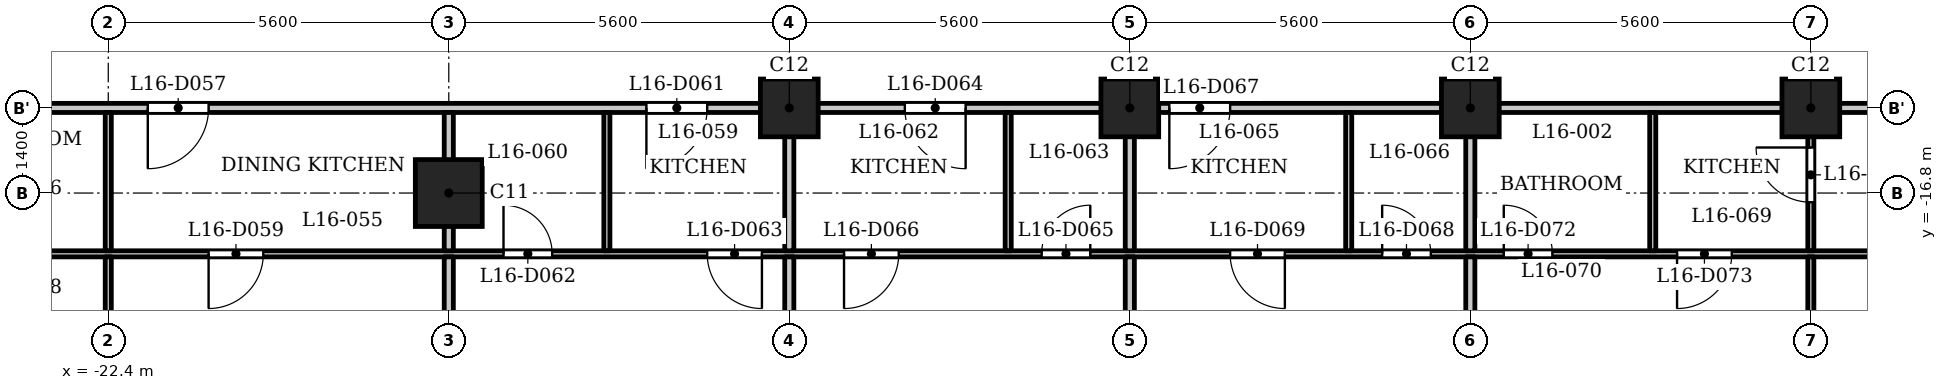
"""IFC4 building model, lengths in metres.
Left out: names, types, materials, properties, quantities, classifications, styles, units other than length and angle.
Written with IfcOpenShell. Run it as: python <this file> out.ifc"""

import sys

from ifc_helpers import new_model, si_unit, direction, frame, frame_2d, origin, origin_2d, place, context, subcontext, project, spatial, rectangle, extrude, element, fill, save


model = new_model("IFC4")
c1 = context("Model", 3, precision=1e-05, world=origin(), true_north=direction((0.0, 1.0)))
c2 = subcontext(c1, "Body", "Model", "MODEL_VIEW")
j1 = project(units=[si_unit("LENGTHUNIT", "METRE"), si_unit("PLANEANGLEUNIT", "RADIAN")], contexts=[c1])
p1 = place(None, origin())
s1 = spatial("IfcSite", under=j1, at=p1, CompositionType="ELEMENT")
p2 = place(p1, origin())
s2 = spatial("IfcBuilding", under=s1, at=p2, CompositionType="ELEMENT")
p3 = place(p2, frame((0.0, 0.0, 65.5)))
s3 = spatial("IfcBuildingStorey", under=s2, at=p3, CompositionType="ELEMENT", Elevation=65.5)
p4 = place(p3, frame((-16.8, -16.8, 0.0), z_axis=(0.0, 0.0, 1.0), x_axis=(1.0, 0.0, 0.0)))
e1 = element("IfcColumn", 1, at=p4, inside=s3, PredefinedType="COLUMN", context=c2, shape_type="SweptSolid", body=[
    extrude(rectangle(XDim=1.1, YDim=1.1, at=origin_2d()), origin(), (0.0, 0.0, 1.0), 3.5),
])
for number, where, z_axis, x_axis in (
    (2, (-11.2, -15.4, 0.0), (0.0, 0.0, 1.0), (1.0, 0.0, 0.0)),
    (3, (-5.6, -15.4, 0.0), (0.0, 0.0, 1.0), (1.0, 0.0, 0.0)),
    (4, (0.0, -15.4, 0.0), (0.0, 0.0, 1.0), (1.0, 0.0, 0.0)),
    (5, (5.6, -15.4, 0.0), (0.0, 0.0, 1.0), (1.0, 0.0, 0.0)),
):
    element("IfcColumn", number, at=place(p3, frame(where, z_axis=z_axis, x_axis=x_axis)), inside=s3, PredefinedType="COLUMN", context=c2, shape_type="SweptSolid", body=[
        extrude(rectangle(XDim=0.95, YDim=0.95, at=origin_2d()), origin(), (0.0, 0.0, 1.0), 3.5),
    ])
p5 = place(p3, frame((-26.394, -17.8, 0.0), z_axis=(0.0, 0.0, 1.0), x_axis=(1.0, 0.0, 0.0)))
e6 = element("IfcWall", 6, at=p5, inside=s3, PredefinedType="PARTITIONING", context=c2, shape_type="SweptSolid", body=[
    extrude(rectangle(XDim=53.034, YDim=0.1, at=frame_2d((26.517, 0.0))), origin(), (0.0, 0.0, 1.0), 3.2),
])
p6 = place(p5, frame((0.794, 0.0, 0.0)))
e7 = element("IfcOpeningElement", 7, at=p6, cuts=e6, PredefinedType="OPENING", context=c2, shape_type="SweptSolid", body=[
    extrude(rectangle(XDim=0.8, YDim=2.1, at=frame_2d((0.4, 1.05))), frame((0.0, 0.06, 0.0), z_axis=(0.0, -1.0, 0.0), x_axis=(1.0, 0.0, 0.0)), (0.0, 0.0, 1.0), 0.12),
])
p7 = place(p5, frame((5.644, 0.0, 0.0)))
e8 = element("IfcOpeningElement", 8, at=p7, cuts=e6, PredefinedType="OPENING", context=c2, shape_type="SweptSolid", body=[
    extrude(rectangle(XDim=0.9, YDim=2.1, at=frame_2d((0.45, 1.05))), frame((0.0, 0.06, 0.0), z_axis=(0.0, -1.0, 0.0), x_axis=(1.0, 0.0, 0.0)), (0.0, 0.0, 1.0), 0.12),
])
p8 = place(p5, frame((10.494, 0.0, 0.0)))
e9 = element("IfcOpeningElement", 9, at=p8, cuts=e6, PredefinedType="OPENING", context=c2, shape_type="SweptSolid", body=[
    extrude(rectangle(XDim=0.8, YDim=2.1, at=frame_2d((0.4, 1.05))), frame((0.0, 0.06, 0.0), z_axis=(0.0, -1.0, 0.0), x_axis=(1.0, 0.0, 0.0)), (0.0, 0.0, 1.0), 0.12),
])
p9 = place(p5, frame((13.844, 0.0, 0.0)))
e10 = element("IfcOpeningElement", 10, at=p9, cuts=e6, PredefinedType="OPENING", context=c2, shape_type="SweptSolid", body=[
    extrude(rectangle(XDim=0.9, YDim=2.1, at=frame_2d((0.45, 1.05))), frame((0.0, 0.06, 0.0), z_axis=(0.0, -1.0, 0.0), x_axis=(1.0, 0.0, 0.0)), (0.0, 0.0, 1.0), 0.12),
])
p10 = place(p5, frame((19.344, 0.0, 0.0)))
e11 = element("IfcOpeningElement", 11, at=p10, cuts=e6, PredefinedType="OPENING", context=c2, shape_type="SweptSolid", body=[
    extrude(rectangle(XDim=0.8, YDim=2.1, at=frame_2d((0.4, 1.05))), frame((0.0, 0.06, 0.0), z_axis=(0.0, -1.0, 0.0), x_axis=(1.0, 0.0, 0.0)), (0.0, 0.0, 1.0), 0.12),
])
p11 = place(p5, frame((16.094, 0.0, 0.0)))
e12 = element("IfcOpeningElement", 12, at=p11, cuts=e6, PredefinedType="OPENING", context=c2, shape_type="SweptSolid", body=[
    extrude(rectangle(XDim=0.9, YDim=2.1, at=frame_2d((0.45, 1.05))), frame((0.0, 0.06, 0.0), z_axis=(0.0, -1.0, 0.0), x_axis=(1.0, 0.0, 0.0)), (0.0, 0.0, 1.0), 0.12),
])
p12 = place(p5, frame((24.944, 0.0, 0.0)))
e13 = element("IfcOpeningElement", 13, at=p12, cuts=e6, PredefinedType="OPENING", context=c2, shape_type="SweptSolid", body=[
    extrude(rectangle(XDim=0.8, YDim=2.1, at=frame_2d((0.4, 1.05))), frame((0.0, 0.06, 0.0), z_axis=(0.0, -1.0, 0.0), x_axis=(1.0, 0.0, 0.0)), (0.0, 0.0, 1.0), 0.12),
])
p13 = place(p5, frame((22.444, 0.0, 0.0)))
e14 = element("IfcOpeningElement", 14, at=p13, cuts=e6, PredefinedType="OPENING", context=c2, shape_type="SweptSolid", body=[
    extrude(rectangle(XDim=0.9, YDim=2.1, at=frame_2d((0.45, 1.05))), frame((0.0, 0.06, 0.0), z_axis=(0.0, -1.0, 0.0), x_axis=(1.0, 0.0, 0.0)), (0.0, 0.0, 1.0), 0.12),
])
p14 = place(p5, frame((26.944, 0.0, 0.0)))
e15 = element("IfcOpeningElement", 15, at=p14, cuts=e6, PredefinedType="OPENING", context=c2, shape_type="SweptSolid", body=[
    extrude(rectangle(XDim=0.8, YDim=2.1, at=frame_2d((0.4, 1.05))), frame((0.0, 0.06, 0.0), z_axis=(0.0, -1.0, 0.0), x_axis=(1.0, 0.0, 0.0)), (0.0, 0.0, 1.0), 0.12),
])
p15 = place(p5, frame((29.794, 0.0, 0.0)))
e16 = element("IfcOpeningElement", 16, at=p15, cuts=e6, PredefinedType="OPENING", context=c2, shape_type="SweptSolid", body=[
    extrude(rectangle(XDim=0.9, YDim=2.1, at=frame_2d((0.45, 1.05))), frame((0.0, 0.06, 0.0), z_axis=(0.0, -1.0, 0.0), x_axis=(1.0, 0.0, 0.0)), (0.0, 0.0, 1.0), 0.12),
])
p16 = place(p5, frame((33.394, 0.0, 0.0)))
e17 = element("IfcOpeningElement", 17, at=p16, cuts=e6, PredefinedType="OPENING", context=c2, shape_type="SweptSolid", body=[
    extrude(rectangle(XDim=0.9, YDim=2.1, at=frame_2d((0.45, 1.05))), frame((0.0, 0.06, 0.0), z_axis=(0.0, -1.0, 0.0), x_axis=(1.0, 0.0, 0.0)), (0.0, 0.0, 1.0), 0.12),
])
p17 = place(p5, frame((34.944, 0.0, 0.0)))
e18 = element("IfcOpeningElement", 18, at=p17, cuts=e6, PredefinedType="OPENING", context=c2, shape_type="SweptSolid", body=[
    extrude(rectangle(XDim=0.9, YDim=2.1, at=frame_2d((0.45, 1.05))), frame((0.0, 0.06, 0.0), z_axis=(0.0, -1.0, 0.0), x_axis=(1.0, 0.0, 0.0)), (0.0, 0.0, 1.0), 0.12),
])
p18 = place(p5, frame((38.144, 0.0, 0.0)))
e19 = element("IfcOpeningElement", 19, at=p18, cuts=e6, PredefinedType="OPENING", context=c2, shape_type="SweptSolid", body=[
    extrude(rectangle(XDim=0.8, YDim=2.1, at=frame_2d((0.4, 1.05))), frame((0.0, 0.06, 0.0), z_axis=(0.0, -1.0, 0.0), x_axis=(1.0, 0.0, 0.0)), (0.0, 0.0, 1.0), 0.12),
])
p19 = place(p5, frame((40.244, 0.0, 0.0)))
e20 = element("IfcOpeningElement", 20, at=p19, cuts=e6, PredefinedType="OPENING", context=c2, shape_type="SweptSolid", body=[
    extrude(rectangle(XDim=0.9, YDim=2.1, at=frame_2d((0.45, 1.05))), frame((0.0, 0.06, 0.0), z_axis=(0.0, -1.0, 0.0), x_axis=(1.0, 0.0, 0.0)), (0.0, 0.0, 1.0), 0.12),
])
p20 = place(p5, frame((49.362, 0.0, 0.0)))
e21 = element("IfcOpeningElement", 21, at=p20, cuts=e6, PredefinedType="OPENING", context=c2, shape_type="SweptSolid", body=[
    extrude(rectangle(XDim=0.8, YDim=2.1, at=frame_2d((0.4, 1.05))), frame((0.0, 0.06, 0.0), z_axis=(0.0, -1.0, 0.0), x_axis=(1.0, 0.0, 0.0)), (0.0, 0.0, 1.0), 0.12),
])
p21 = place(p5, frame((45.094, 0.0, 0.0)))
e22 = element("IfcOpeningElement", 22, at=p21, cuts=e6, PredefinedType="OPENING", context=c2, shape_type="SweptSolid", body=[
    extrude(rectangle(XDim=0.9, YDim=2.1, at=frame_2d((0.45, 1.05))), frame((0.0, 0.06, 0.0), z_axis=(0.0, -1.0, 0.0), x_axis=(1.0, 0.0, 0.0)), (0.0, 0.0, 1.0), 0.12),
])
p22 = place(p3, frame((-27.484, -15.4, 0.0), z_axis=(0.0, 0.0, 1.0), x_axis=(1.0, 0.0, 0.0)))
e23 = element("IfcWall", 23, at=p22, inside=s3, PredefinedType="PARTITIONING", context=c2, shape_type="SweptSolid", body=[
    extrude(rectangle(XDim=54.968, YDim=0.15, at=frame_2d((27.484, 0.0))), origin(), (0.0, 0.0, 1.0), 3.2),
])
p23 = place(p22, frame((5.734, 0.0, 0.0)))
e24 = element("IfcOpeningElement", 24, at=p23, cuts=e23, PredefinedType="OPENING", context=c2, shape_type="SweptSolid", body=[
    extrude(rectangle(XDim=1.0, YDim=2.1, at=frame_2d((0.5, 1.05))), frame((0.0, 0.085, 0.0), z_axis=(0.0, -1.0, 0.0), x_axis=(1.0, 0.0, 0.0)), (0.0, 0.0, 1.0), 0.17),
])
p24 = place(p22, frame((13.934, 0.0, 0.0)))
e25 = element("IfcOpeningElement", 25, at=p24, cuts=e23, PredefinedType="OPENING", context=c2, shape_type="SweptSolid", body=[
    extrude(rectangle(XDim=1.0, YDim=2.1, at=frame_2d((0.5, 1.05))), frame((0.0, 0.085, 0.0), z_axis=(0.0, -1.0, 0.0), x_axis=(1.0, 0.0, 0.0)), (0.0, 0.0, 1.0), 0.17),
])
p25 = place(p22, frame((18.184, 0.0, 0.0)))
e26 = element("IfcOpeningElement", 26, at=p25, cuts=e23, PredefinedType="OPENING", context=c2, shape_type="SweptSolid", body=[
    extrude(rectangle(XDim=1.0, YDim=2.1, at=frame_2d((0.5, 1.05))), frame((0.0, 0.085, 0.0), z_axis=(0.0, -1.0, 0.0), x_axis=(1.0, 0.0, 0.0)), (0.0, 0.0, 1.0), 0.17),
])
p26 = place(p22, frame((22.534, 0.0, 0.0)))
e27 = element("IfcOpeningElement", 27, at=p26, cuts=e23, PredefinedType="OPENING", context=c2, shape_type="SweptSolid", body=[
    extrude(rectangle(XDim=1.0, YDim=2.1, at=frame_2d((0.5, 1.05))), frame((0.0, 0.085, 0.0), z_axis=(0.0, -1.0, 0.0), x_axis=(1.0, 0.0, 0.0)), (0.0, 0.0, 1.0), 0.17),
])
p27 = place(p22, frame((36.984, 0.0, 0.0)))
e28 = element("IfcOpeningElement", 28, at=p27, cuts=e23, PredefinedType="OPENING", context=c2, shape_type="SweptSolid", body=[
    extrude(rectangle(XDim=1.0, YDim=2.1, at=frame_2d((0.5, 1.05))), frame((0.0, 0.085, 0.0), z_axis=(0.0, -1.0, 0.0), x_axis=(1.0, 0.0, 0.0)), (0.0, 0.0, 1.0), 0.17),
])
p28 = place(p22, frame((42.334, 0.0, 0.0)))
e29 = element("IfcOpeningElement", 29, at=p28, cuts=e23, PredefinedType="OPENING", context=c2, shape_type="SweptSolid", body=[
    extrude(rectangle(XDim=1.0, YDim=2.1, at=frame_2d((0.5, 1.05))), frame((0.0, 0.085, 0.0), z_axis=(0.0, -1.0, 0.0), x_axis=(1.0, 0.0, 0.0)), (0.0, 0.0, 1.0), 0.17),
])
p29 = place(p22, frame((45.184, 0.0, 0.0)))
e30 = element("IfcOpeningElement", 30, at=p29, cuts=e23, PredefinedType="OPENING", context=c2, shape_type="SweptSolid", body=[
    extrude(rectangle(XDim=1.0, YDim=2.1, at=frame_2d((0.5, 1.05))), frame((0.0, 0.085, 0.0), z_axis=(0.0, -1.0, 0.0), x_axis=(1.0, 0.0, 0.0)), (0.0, 0.0, 1.0), 0.17),
])
p30 = place(p3, frame((-22.4, -21.72, 0.0), z_axis=(0.0, 0.0, 1.0), x_axis=(0.0, 1.0, 0.0)))
e31 = element("IfcWall", 31, at=p30, inside=s3, PredefinedType="PARTITIONING", context=c2, shape_type="SweptSolid", body=[
    extrude(rectangle(XDim=3.87, YDim=0.1, at=frame_2d((1.935, 0.0))), origin(), (0.0, 0.0, 1.0), 3.2),
])
p31 = place(p30, frame((1.87, 0.0, 0.0)))
e32 = element("IfcOpeningElement", 32, at=p31, cuts=e31, PredefinedType="OPENING", context=c2, shape_type="SweptSolid", body=[
    extrude(rectangle(XDim=0.9, YDim=2.1, at=frame_2d((0.45, 1.05))), frame((0.0, 0.06, 0.0), z_axis=(0.0, -1.0, 0.0), x_axis=(1.0, 0.0, 0.0)), (0.0, 0.0, 1.0), 0.12),
])
p32 = place(p3, frame((-22.4, -17.75, 0.0), z_axis=(0.0, 0.0, 1.0), x_axis=(0.0, 1.0, 0.0)))
e33 = element("IfcWall", 33, at=p32, inside=s3, PredefinedType="PARTITIONING", context=c2, shape_type="SweptSolid", body=[
    extrude(rectangle(XDim=2.275, YDim=0.1, at=frame_2d((1.137, 0.0))), origin(), (0.0, 0.0, 1.0), 3.2),
])
p33 = place(p3, frame((-16.8, -23.08, 0.0), z_axis=(0.0, 0.0, 1.0), x_axis=(0.0, 1.0, 0.0)))
e34 = element("IfcWall", 34, at=p33, inside=s3, PredefinedType="PARTITIONING", context=c2, shape_type="SweptSolid", body=[
    extrude(rectangle(XDim=5.23, YDim=0.15, at=frame_2d((2.615, 0.0))), origin(), (0.0, 0.0, 1.0), 3.2),
])
p34 = place(p3, frame((-16.8, -17.75, 0.0), z_axis=(0.0, 0.0, 1.0), x_axis=(0.0, 1.0, 0.0)))
e35 = element("IfcWall", 35, at=p34, inside=s3, PredefinedType="PARTITIONING", context=c2, shape_type="SweptSolid", body=[
    extrude(rectangle(XDim=2.275, YDim=0.15, at=frame_2d((1.137, 0.0))), origin(), (0.0, 0.0, 1.0), 3.2),
])
p35 = place(p3, frame((-14.2, -17.75, 0.0), z_axis=(0.0, 0.0, 1.0), x_axis=(0.0, 1.0, 0.0)))
e36 = element("IfcWall", 36, at=p35, inside=s3, PredefinedType="PARTITIONING", context=c2, shape_type="SweptSolid", body=[
    extrude(rectangle(XDim=2.275, YDim=0.1, at=frame_2d((1.137, 0.0))), origin(), (0.0, 0.0, 1.0), 3.2),
])
p36 = place(p3, frame((-11.2, -23.08, 0.0), z_axis=(0.0, 0.0, 1.0), x_axis=(0.0, 1.0, 0.0)))
e37 = element("IfcWall", 37, at=p36, inside=s3, PredefinedType="PARTITIONING", context=c2, shape_type="SweptSolid", body=[
    extrude(rectangle(XDim=5.23, YDim=0.15, at=frame_2d((2.615, 0.0))), origin(), (0.0, 0.0, 1.0), 3.2),
])
p37 = place(p3, frame((-11.2, -17.75, 0.0), z_axis=(0.0, 0.0, 1.0), x_axis=(0.0, 1.0, 0.0)))
e38 = element("IfcWall", 38, at=p37, inside=s3, PredefinedType="PARTITIONING", context=c2, shape_type="SweptSolid", body=[
    extrude(rectangle(XDim=2.275, YDim=0.15, at=frame_2d((1.137, 0.0))), origin(), (0.0, 0.0, 1.0), 3.2),
])
p38 = place(p3, frame((-7.6, -17.75, 0.0), z_axis=(0.0, 0.0, 1.0), x_axis=(0.0, 1.0, 0.0)))
e39 = element("IfcWall", 39, at=p38, inside=s3, PredefinedType="PARTITIONING", context=c2, shape_type="SweptSolid", body=[
    extrude(rectangle(XDim=2.275, YDim=0.1, at=frame_2d((1.137, 0.0))), origin(), (0.0, 0.0, 1.0), 3.2),
])
p39 = place(p3, frame((-5.6, -23.08, 0.0), z_axis=(0.0, 0.0, 1.0), x_axis=(0.0, 1.0, 0.0)))
e40 = element("IfcWall", 40, at=p39, inside=s3, PredefinedType="PARTITIONING", context=c2, shape_type="SweptSolid", body=[
    extrude(rectangle(XDim=5.23, YDim=0.15, at=frame_2d((2.615, 0.0))), origin(), (0.0, 0.0, 1.0), 3.2),
])
p40 = place(p3, frame((-5.6, -17.75, 0.0), z_axis=(0.0, 0.0, 1.0), x_axis=(0.0, 1.0, 0.0)))
e41 = element("IfcWall", 41, at=p40, inside=s3, PredefinedType="PARTITIONING", context=c2, shape_type="SweptSolid", body=[
    extrude(rectangle(XDim=2.275, YDim=0.15, at=frame_2d((1.137, 0.0))), origin(), (0.0, 0.0, 1.0), 3.2),
])
p41 = place(p3, frame((-2.0, -17.75, 0.0), z_axis=(0.0, 0.0, 1.0), x_axis=(0.0, 1.0, 0.0)))
e42 = element("IfcWall", 42, at=p41, inside=s3, PredefinedType="PARTITIONING", context=c2, shape_type="SweptSolid", body=[
    extrude(rectangle(XDim=2.275, YDim=0.1, at=frame_2d((1.137, 0.0))), origin(), (0.0, 0.0, 1.0), 3.2),
])
p42 = place(p3, frame((0.0, -23.08, 0.0), z_axis=(0.0, 0.0, 1.0), x_axis=(0.0, 1.0, 0.0)))
e43 = element("IfcWall", 43, at=p42, inside=s3, PredefinedType="PARTITIONING", context=c2, shape_type="SweptSolid", body=[
    extrude(rectangle(XDim=5.23, YDim=0.15, at=frame_2d((2.615, 0.0))), origin(), (0.0, 0.0, 1.0), 3.2),
])
p43 = place(p3, frame((0.0, -17.75, 0.0), z_axis=(0.0, 0.0, 1.0), x_axis=(0.0, 1.0, 0.0)))
e44 = element("IfcWall", 44, at=p43, inside=s3, PredefinedType="PARTITIONING", context=c2, shape_type="SweptSolid", body=[
    extrude(rectangle(XDim=2.275, YDim=0.15, at=frame_2d((1.137, 0.0))), origin(), (0.0, 0.0, 1.0), 3.2),
])
p44 = place(p3, frame((3.0, -17.75, 0.0), z_axis=(0.0, 0.0, 1.0), x_axis=(0.0, 1.0, 0.0)))
e45 = element("IfcWall", 45, at=p44, inside=s3, PredefinedType="PARTITIONING", context=c2, shape_type="SweptSolid", body=[
    extrude(rectangle(XDim=2.275, YDim=0.1, at=frame_2d((1.137, 0.0))), origin(), (0.0, 0.0, 1.0), 3.2),
])
p45 = place(p3, frame((5.6, -23.08, 0.0), z_axis=(0.0, 0.0, 1.0), x_axis=(0.0, 1.0, 0.0)))
e46 = element("IfcWall", 46, at=p45, inside=s3, PredefinedType="PARTITIONING", context=c2, shape_type="SweptSolid", body=[
    extrude(rectangle(XDim=5.23, YDim=0.1, at=frame_2d((2.615, 0.0))), origin(), (0.0, 0.0, 1.0), 3.2),
])
p46 = place(p3, frame((5.6, -17.75, 0.0), z_axis=(0.0, 0.0, 1.0), x_axis=(0.0, 1.0, 0.0)))
e47 = element("IfcWall", 47, at=p46, inside=s3, PredefinedType="PARTITIONING", context=c2, shape_type="SweptSolid", body=[
    extrude(rectangle(XDim=2.275, YDim=0.1, at=frame_2d((1.137, 0.0))), origin(), (0.0, 0.0, 1.0), 3.2),
])
p47 = place(p46, frame((0.799, 0.0, 0.0)))
e48 = element("IfcOpeningElement", 48, at=p47, cuts=e47, PredefinedType="OPENING", context=c2, shape_type="SweptSolid", body=[
    extrude(rectangle(XDim=0.9, YDim=2.1, at=frame_2d((0.45, 1.05))), frame((0.0, 0.06, 0.0), z_axis=(0.0, -1.0, 0.0), x_axis=(1.0, 0.0, 0.0)), (0.0, 0.0, 1.0), 0.12),
])
p48 = place(p23, origin())
e49 = element("IfcDoor", 49, at=p48, inside=s3, OperationType="SINGLE_SWING_LEFT", PredefinedType="DOOR", context=c2, shape_type="SweptSolid", body=[
    extrude(rectangle(XDim=1.0, YDim=2.1, at=frame_2d((0.5, 1.05))), frame((0.0, 0.025, 0.0), z_axis=(0.0, -1.0, 0.0), x_axis=(1.0, 0.0, 0.0)), (0.0, 0.0, 1.0), 0.05),
])
fill(e24, e49)
p49 = place(p7, origin())
e50 = element("IfcDoor", 50, at=p49, inside=s3, OperationType="SINGLE_SWING_LEFT", PredefinedType="DOOR", context=c2, shape_type="SweptSolid", body=[
    extrude(rectangle(XDim=0.9, YDim=2.1, at=frame_2d((0.45, 1.05))), frame((0.0, 0.025, 0.0), z_axis=(0.0, -1.0, 0.0), x_axis=(1.0, 0.0, 0.0)), (0.0, 0.0, 1.0), 0.05),
])
fill(e8, e50)
p50 = place(p24, origin())
e51 = element("IfcDoor", 51, at=p50, inside=s3, OperationType="SINGLE_SWING_LEFT", PredefinedType="DOOR", context=c2, shape_type="SweptSolid", body=[
    extrude(rectangle(XDim=1.0, YDim=2.1, at=frame_2d((0.5, 1.05))), frame((0.0, 0.025, 0.0), z_axis=(0.0, -1.0, 0.0), x_axis=(1.0, 0.0, 0.0)), (0.0, 0.0, 1.0), 0.05),
])
fill(e25, e51)
p51 = place(p8, origin())
e52 = element("IfcDoor", 52, at=p51, inside=s3, OperationType="SINGLE_SWING_RIGHT", PredefinedType="DOOR", context=c2, shape_type="SweptSolid", body=[
    extrude(rectangle(XDim=0.8, YDim=2.1, at=frame_2d((0.4, 1.05))), frame((0.0, 0.025, 0.0), z_axis=(0.0, -1.0, 0.0), x_axis=(1.0, 0.0, 0.0)), (0.0, 0.0, 1.0), 0.05),
])
fill(e9, e52)
p52 = place(p9, origin())
e53 = element("IfcDoor", 53, at=p52, inside=s3, OperationType="SINGLE_SWING_RIGHT", PredefinedType="DOOR", context=c2, shape_type="SweptSolid", body=[
    extrude(rectangle(XDim=0.9, YDim=2.1, at=frame_2d((0.45, 1.05))), frame((0.0, 0.025, 0.0), z_axis=(0.0, -1.0, 0.0), x_axis=(1.0, 0.0, 0.0)), (0.0, 0.0, 1.0), 0.05),
])
fill(e10, e53)
p53 = place(p25, origin())
e54 = element("IfcDoor", 54, at=p53, inside=s3, OperationType="SINGLE_SWING_RIGHT", PredefinedType="DOOR", context=c2, shape_type="SweptSolid", body=[
    extrude(rectangle(XDim=1.0, YDim=2.1, at=frame_2d((0.5, 1.05))), frame((0.0, 0.025, 0.0), z_axis=(0.0, -1.0, 0.0), x_axis=(1.0, 0.0, 0.0)), (0.0, 0.0, 1.0), 0.05),
])
fill(e26, e54)
p54 = place(p10, origin())
e55 = element("IfcDoor", 55, at=p54, inside=s3, OperationType="SINGLE_SWING_LEFT", PredefinedType="DOOR", context=c2, shape_type="SweptSolid", body=[
    extrude(rectangle(XDim=0.8, YDim=2.1, at=frame_2d((0.4, 1.05))), frame((0.0, 0.025, 0.0), z_axis=(0.0, -1.0, 0.0), x_axis=(1.0, 0.0, 0.0)), (0.0, 0.0, 1.0), 0.05),
])
fill(e11, e55)
p55 = place(p11, origin())
e56 = element("IfcDoor", 56, at=p55, inside=s3, OperationType="SINGLE_SWING_LEFT", PredefinedType="DOOR", context=c2, shape_type="SweptSolid", body=[
    extrude(rectangle(XDim=0.9, YDim=2.1, at=frame_2d((0.45, 1.05))), frame((0.0, 0.025, 0.0), z_axis=(0.0, -1.0, 0.0), x_axis=(1.0, 0.0, 0.0)), (0.0, 0.0, 1.0), 0.05),
])
fill(e12, e56)
p56 = place(p26, origin())
e57 = element("IfcDoor", 57, at=p56, inside=s3, OperationType="SINGLE_SWING_LEFT", PredefinedType="DOOR", context=c2, shape_type="SweptSolid", body=[
    extrude(rectangle(XDim=1.0, YDim=2.1, at=frame_2d((0.5, 1.05))), frame((0.0, 0.025, 0.0), z_axis=(0.0, -1.0, 0.0), x_axis=(1.0, 0.0, 0.0)), (0.0, 0.0, 1.0), 0.05),
])
fill(e27, e57)
p57 = place(p12, origin())
e58 = element("IfcDoor", 58, at=p57, inside=s3, OperationType="SINGLE_SWING_RIGHT", PredefinedType="DOOR", context=c2, shape_type="SweptSolid", body=[
    extrude(rectangle(XDim=0.8, YDim=2.1, at=frame_2d((0.4, 1.05))), frame((0.0, 0.025, 0.0), z_axis=(0.0, -1.0, 0.0), x_axis=(1.0, 0.0, 0.0)), (0.0, 0.0, 1.0), 0.05),
])
fill(e13, e58)
p58 = place(p13, origin())
e59 = element("IfcDoor", 59, at=p58, inside=s3, OperationType="SINGLE_SWING_RIGHT", PredefinedType="DOOR", context=c2, shape_type="SweptSolid", body=[
    extrude(rectangle(XDim=0.9, YDim=2.1, at=frame_2d((0.45, 1.05))), frame((0.0, 0.025, 0.0), z_axis=(0.0, -1.0, 0.0), x_axis=(1.0, 0.0, 0.0)), (0.0, 0.0, 1.0), 0.05),
])
fill(e14, e59)
p59 = place(p47, origin())
e60 = element("IfcDoor", 60, at=p59, inside=s3, OperationType="SINGLE_SWING_LEFT", PredefinedType="DOOR", context=c2, shape_type="SweptSolid", body=[
    extrude(rectangle(XDim=0.9, YDim=2.1, at=frame_2d((0.45, 1.05))), frame((0.0, 0.025, 0.0), z_axis=(0.0, -1.0, 0.0), x_axis=(1.0, 0.0, 0.0)), (0.0, 0.0, 1.0), 0.05),
])
fill(e48, e60)
p60 = place(p14, origin())
e61 = element("IfcDoor", 61, at=p60, inside=s3, OperationType="SINGLE_SWING_RIGHT", PredefinedType="DOOR", context=c2, shape_type="SweptSolid", body=[
    extrude(rectangle(XDim=0.8, YDim=2.1, at=frame_2d((0.4, 1.05))), frame((0.0, 0.025, 0.0), z_axis=(0.0, -1.0, 0.0), x_axis=(1.0, 0.0, 0.0)), (0.0, 0.0, 1.0), 0.05),
])
fill(e15, e61)
p61 = place(p15, origin())
e62 = element("IfcDoor", 62, at=p61, inside=s3, OperationType="SINGLE_SWING_LEFT", PredefinedType="DOOR", context=c2, shape_type="SweptSolid", body=[
    extrude(rectangle(XDim=0.9, YDim=2.1, at=frame_2d((0.45, 1.05))), frame((0.0, 0.025, 0.0), z_axis=(0.0, -1.0, 0.0), x_axis=(1.0, 0.0, 0.0)), (0.0, 0.0, 1.0), 0.05),
])
fill(e16, e62)
save(model, sys.argv[1])
